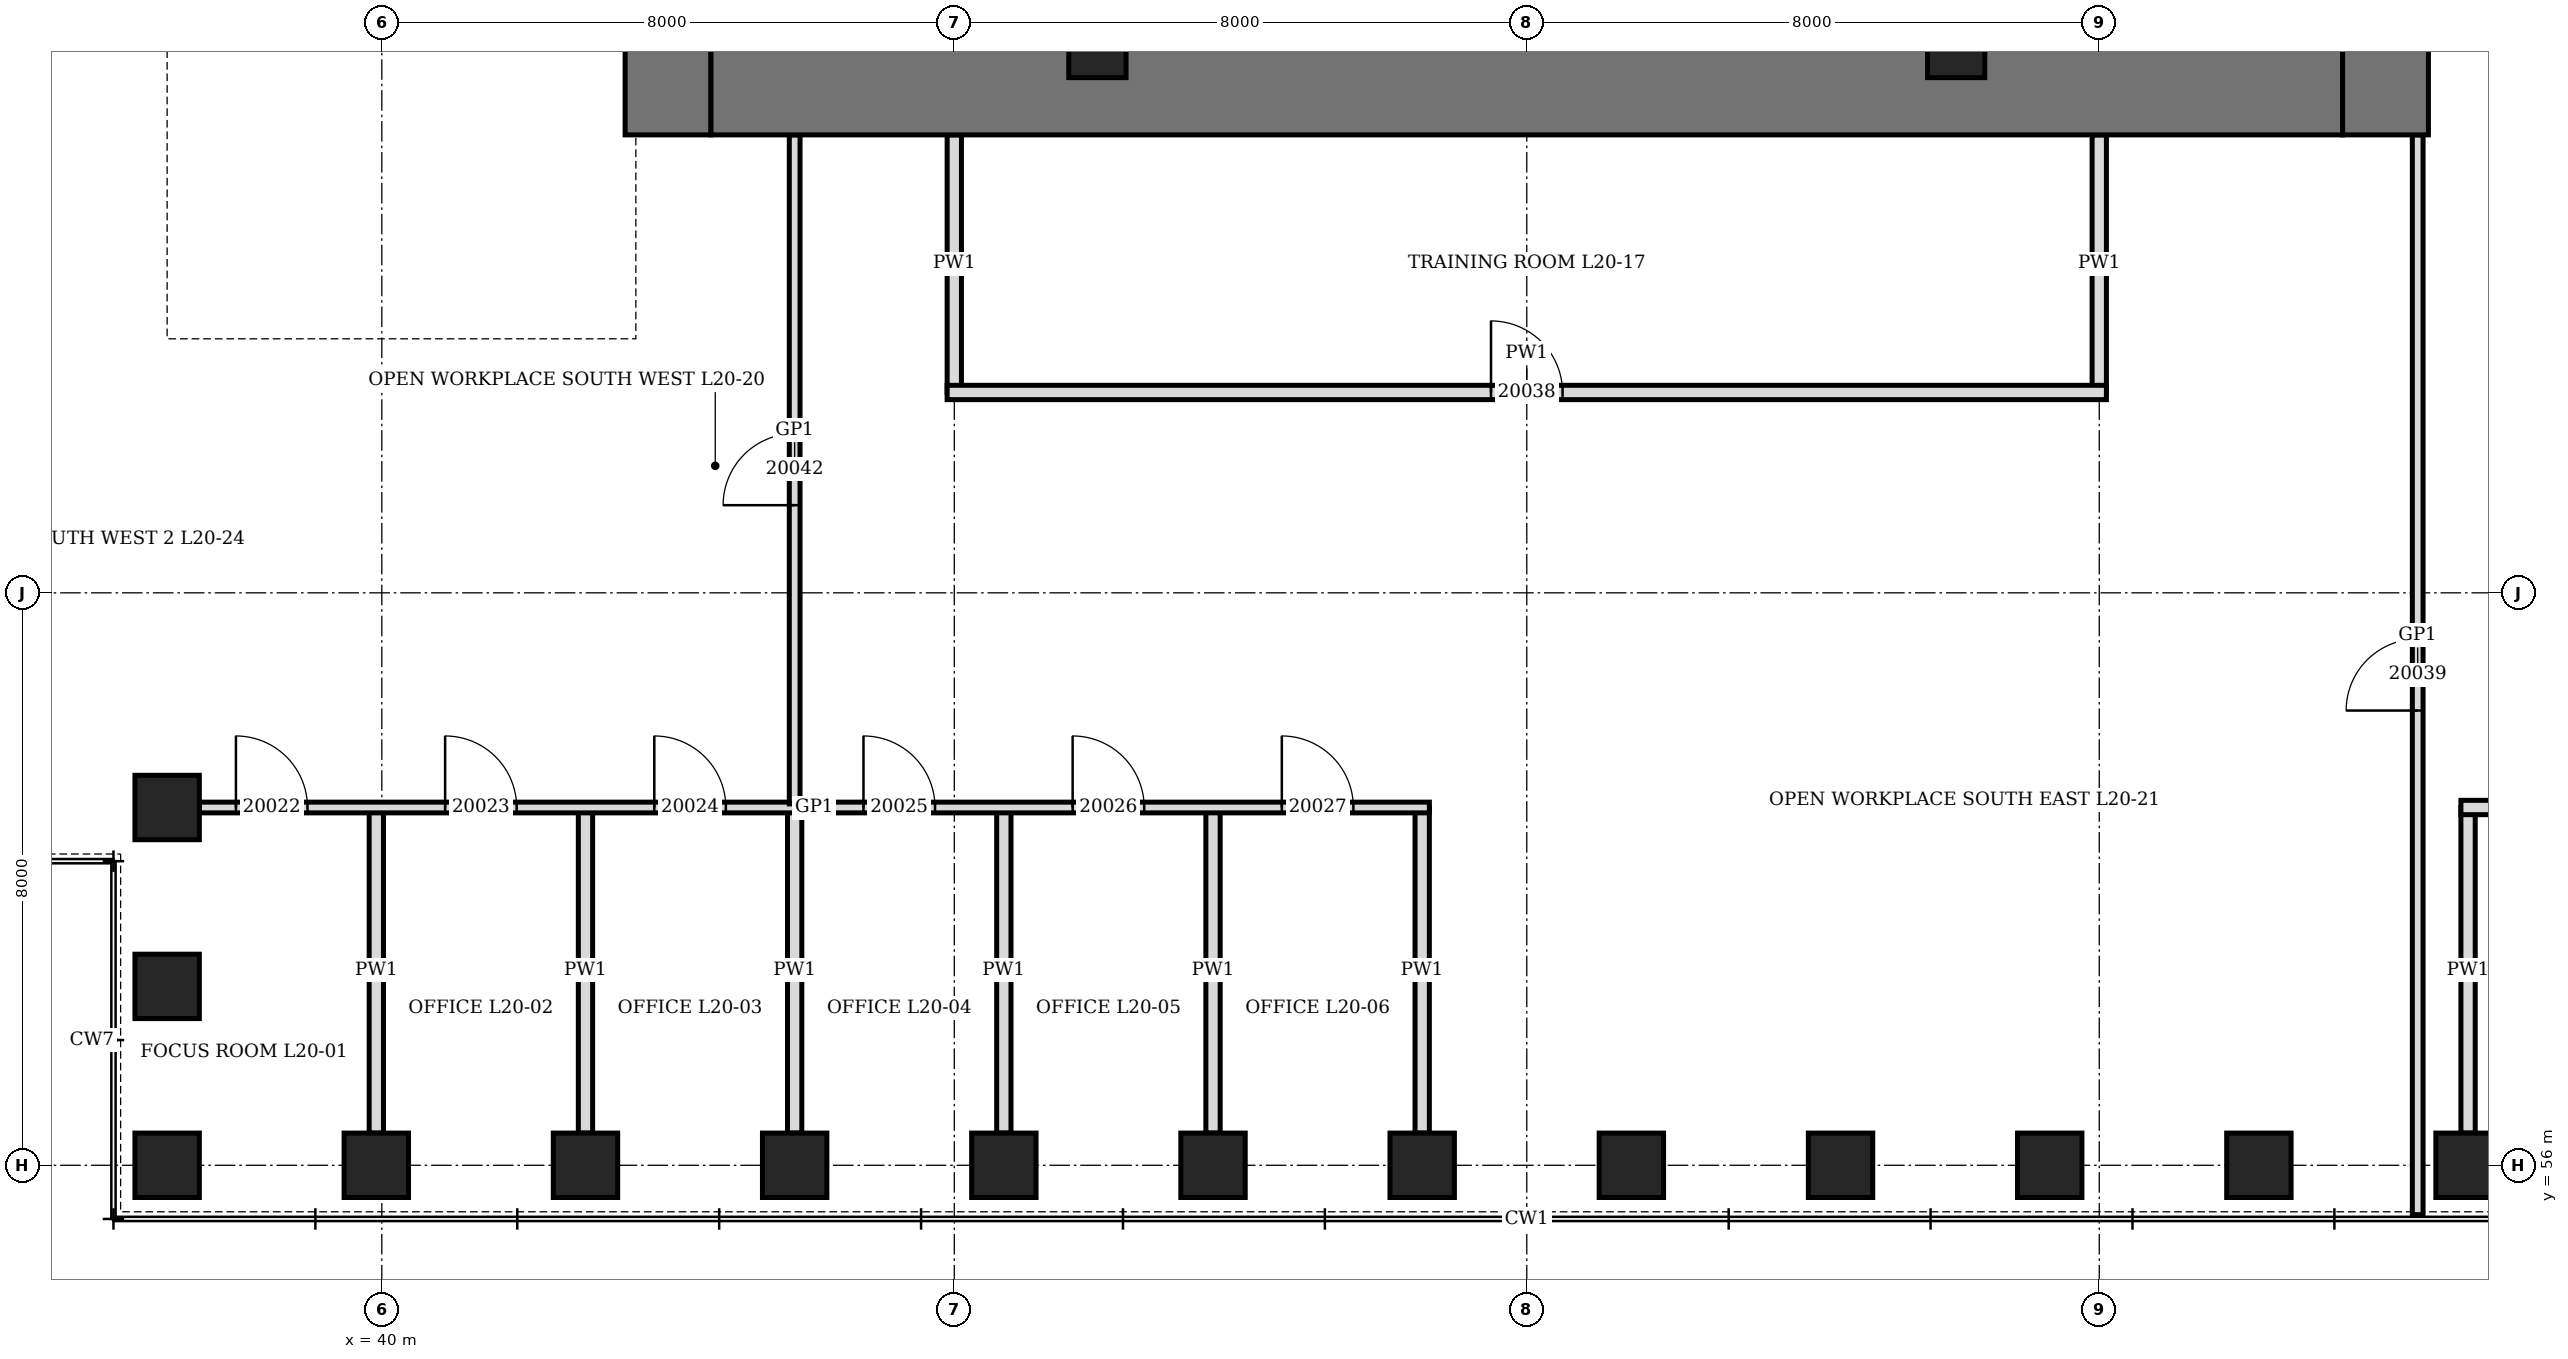
"""IFC4 building model, lengths in metres.
Left out: names, types, materials, properties, quantities, classifications, styles, units other than length and angle.
Written with IfcOpenShell. Run it as: python <this file> out.ifc"""

import sys

from ifc_helpers import new_model, si_unit, direction, frame, frame_2d, origin, origin_2d, place, context, subcontext, project, spatial, rectangle, hollow_rectangle, extrude, element, fill, save


model = new_model("IFC4")
c1 = context("Model", 3, precision=1e-05, world=origin(), true_north=direction((0.0, 1.0)))
c2 = subcontext(c1, "Body", "Model", "MODEL_VIEW")
j1 = project(units=[si_unit("LENGTHUNIT", "METRE"), si_unit("PLANEANGLEUNIT", "RADIAN")], contexts=[c1])
p1 = place(None, origin())
s1 = spatial("IfcSite", under=j1, at=p1, CompositionType="ELEMENT")
p2 = place(p1, origin())
s2 = spatial("IfcBuilding", under=s1, at=p2, CompositionType="ELEMENT")
p3 = place(p2, frame((0.0, 0.0, 93.7)))
s3 = spatial("IfcBuildingStorey", under=s2, at=p3, CompositionType="ELEMENT", Elevation=93.7)
for number, where, z_axis, x_axis in (
    (1, (37.0, 56.0, 0.0), (0.0, 0.0, 1.0), (1.0, 0.0, 0.0)),
    (2, (39.923, 56.0, 0.0), (0.0, 0.0, 1.0), (1.0, 0.0, 0.0)),
    (3, (42.846, 56.0, 0.0), (0.0, 0.0, 1.0), (1.0, 0.0, 0.0)),
    (4, (45.769, 56.0, 0.0), (0.0, 0.0, 1.0), (1.0, 0.0, 0.0)),
    (5, (48.692, 56.0, 0.0), (0.0, 0.0, 1.0), (1.0, 0.0, 0.0)),
    (6, (51.615, 56.0, 0.0), (0.0, 0.0, 1.0), (1.0, 0.0, 0.0)),
    (7, (54.539, 56.0, 0.0), (0.0, 0.0, 1.0), (1.0, 0.0, 0.0)),
    (8, (57.461, 56.0, 0.0), (0.0, 0.0, 1.0), (1.0, 0.0, 0.0)),
    (9, (60.385, 56.0, 0.0), (0.0, 0.0, 1.0), (1.0, 0.0, 0.0)),
    (10, (63.308, 56.0, 0.0), (0.0, 0.0, 1.0), (1.0, 0.0, 0.0)),
    (11, (66.231, 56.0, 0.0), (0.0, 0.0, 1.0), (1.0, 0.0, 0.0)),
    (12, (69.154, 56.0, 0.0), (0.0, 0.0, 1.0), (1.0, 0.0, 0.0)),
    (13, (37.0, 61.0, 0.0), (0.0, 0.0, 1.0), (0.0, 1.0, 0.0)),
    (14, (37.0, 58.5, 0.0), (0.0, 0.0, 1.0), (0.0, 1.0, 0.0)),
):
    element("IfcColumn", number, at=place(p3, frame(where, z_axis=z_axis, x_axis=x_axis)), inside=s3, PredefinedType="COLUMN", context=c2, shape_type="SweptSolid", body=[
        extrude(hollow_rectangle(XDim=0.9, YDim=0.9, WallThickness=0.12, at=origin_2d()), origin(), (0.0, 0.0, 1.0), 4.2),
    ])
p4 = place(p3, frame((44.0, 70.4, 0.0), z_axis=(0.0, 0.0, 1.0), x_axis=(0.0, 1.0, 0.0)))
e15 = element("IfcWall", 15, at=p4, inside=s3, PredefinedType="SHEAR", context=c2, shape_type="SweptSolid", body=[
    extrude(rectangle(XDim=19.2, YDim=1.2, at=frame_2d((9.6, 0.0))), origin(), (0.0, 0.0, 1.0), 4.2),
])
p5 = place(p4, frame((8.6, 0.0, 0.0)))
e16 = element("IfcOpeningElement", 16, at=p5, cuts=e15, PredefinedType="OPENING", context=c2, shape_type="SweptSolid", body=[
    extrude(rectangle(XDim=2.0, YDim=2.4, at=frame_2d((1.0, 1.2))), frame((0.0, 0.61, 0.0), z_axis=(0.0, -1.0, 0.0), x_axis=(1.0, 0.0, 0.0)), (0.0, 0.0, 1.0), 1.22),
])
p6 = place(p3, frame((68.0, 70.4, 0.0), z_axis=(0.0, 0.0, 1.0), x_axis=(0.0, 1.0, 0.0)))
e17 = element("IfcWall", 17, at=p6, inside=s3, PredefinedType="SHEAR", context=c2, shape_type="SweptSolid", body=[
    extrude(rectangle(XDim=19.2, YDim=1.2, at=frame_2d((9.6, 0.0))), origin(), (0.0, 0.0, 1.0), 4.2),
])
p7 = place(p6, frame((8.6, 0.0, 0.0)))
e18 = element("IfcOpeningElement", 18, at=p7, cuts=e17, PredefinedType="OPENING", context=c2, shape_type="SweptSolid", body=[
    extrude(rectangle(XDim=2.0, YDim=2.4, at=frame_2d((1.0, 1.2))), frame((0.0, 0.61, 0.0), z_axis=(0.0, -1.0, 0.0), x_axis=(1.0, 0.0, 0.0)), (0.0, 0.0, 1.0), 1.22),
])
p8 = place(p3, frame((44.6, 71.0, 0.0), z_axis=(0.0, 0.0, 1.0), x_axis=(1.0, 0.0, 0.0)))
e19 = element("IfcWall", 19, at=p8, inside=s3, PredefinedType="SHEAR", context=c2, shape_type="SweptSolid", body=[
    extrude(rectangle(XDim=22.8, YDim=1.2, at=frame_2d((11.4, 0.0))), origin(), (0.0, 0.0, 1.0), 4.2),
])
for number, where, z_axis, x_axis in (
    (20, (50.0, 71.6, 0.0), (0.0, 0.0, 1.0), (1.0, 0.0, 0.0)),
    (21, (62.0, 71.6, 0.0), (0.0, 0.0, 1.0), (1.0, 0.0, 0.0)),
):
    element("IfcColumn", number, at=place(p3, frame(where, z_axis=z_axis, x_axis=x_axis)), inside=s3, PredefinedType="COLUMN", context=c2, shape_type="SweptSolid", body=[
        extrude(hollow_rectangle(XDim=0.8, YDim=0.8, WallThickness=0.1, at=origin_2d()), origin(), (0.0, 0.0, 1.0), 4.2),
    ])
p9 = place(p3, frame((39.923, 56.45, 0.0), z_axis=(0.0, 0.0, 1.0), x_axis=(0.0, 1.0, 0.0)))
e22 = element("IfcWall", 22, at=p9, inside=s3, PredefinedType="PARTITIONING", context=c2, shape_type="SweptSolid", body=[
    extrude(rectangle(XDim=4.55, YDim=0.2, at=frame_2d((2.275, 0.0))), origin(), (0.0, 0.0, 1.0), 3.428),
])
for number, where, z_axis, x_axis in (
    (23, (42.846, 56.45, 0.0), (0.0, 0.0, 1.0), (0.0, 1.0, 0.0)),
    (24, (45.769, 56.45, 0.0), (0.0, 0.0, 1.0), (0.0, 1.0, 0.0)),
    (25, (48.692, 56.45, 0.0), (0.0, 0.0, 1.0), (0.0, 1.0, 0.0)),
    (26, (51.615, 56.45, 0.0), (0.0, 0.0, 1.0), (0.0, 1.0, 0.0)),
    (27, (54.539, 56.45, 0.0), (0.0, 0.0, 1.0), (0.0, 1.0, 0.0)),
    (28, (69.154, 56.45, 0.0), (0.0, 0.0, 1.0), (0.0, 1.0, 0.0)),
):
    element("IfcWall", number, at=place(p3, frame(where, z_axis=z_axis, x_axis=x_axis)), inside=s3, PredefinedType="PARTITIONING", context=c2, shape_type="SweptSolid", body=[
        extrude(rectangle(XDim=4.55, YDim=0.2, at=frame_2d((2.275, 0.0))), origin(), (0.0, 0.0, 1.0), 3.278),
    ])
for number, where, z_axis, x_axis in (
    (29, (48.0, 66.8, 0.0), (0.0, 0.0, 1.0), (0.0, 1.0, 0.0)),
    (30, (64.0, 66.8, 0.0), (0.0, 0.0, 1.0), (0.0, 1.0, 0.0)),
):
    element("IfcWall", number, at=place(p3, frame(where, z_axis=z_axis, x_axis=x_axis)), inside=s3, PredefinedType="PARTITIONING", context=c2, shape_type="SweptSolid", body=[
        extrude(rectangle(XDim=3.6, YDim=0.2, at=frame_2d((1.8, 0.0))), origin(), (0.0, 0.0, 1.0), 4.04),
    ])
p10 = place(p3, frame((37.45, 61.0, 0.0), z_axis=(0.0, 0.0, 1.0), x_axis=(1.0, 0.0, 0.0)))
e31 = element("IfcWall", 31, at=p10, inside=s3, PredefinedType="PARTITIONING", context=c2, shape_type="SweptSolid", body=[
    extrude(rectangle(XDim=17.188, YDim=0.15, at=frame_2d((8.594, 0.0))), origin(), (0.0, 0.0, 1.0), 4.04),
])
p11 = place(p10, frame((0.511, 0.0, 0.0)))
e32 = element("IfcOpeningElement", 32, at=p11, cuts=e31, PredefinedType="OPENING", context=c2, shape_type="SweptSolid", body=[
    extrude(rectangle(XDim=1.0, YDim=2.4, at=frame_2d((0.5, 1.2))), frame((0.0, 0.085, 0.0), z_axis=(0.0, -1.0, 0.0), x_axis=(1.0, 0.0, 0.0)), (0.0, 0.0, 1.0), 0.17),
])
p12 = place(p10, frame((3.435, 0.0, 0.0)))
e33 = element("IfcOpeningElement", 33, at=p12, cuts=e31, PredefinedType="OPENING", context=c2, shape_type="SweptSolid", body=[
    extrude(rectangle(XDim=1.0, YDim=2.1, at=frame_2d((0.5, 1.05))), frame((0.0, 0.085, 0.0), z_axis=(0.0, -1.0, 0.0), x_axis=(1.0, 0.0, 0.0)), (0.0, 0.0, 1.0), 0.17),
])
p13 = place(p10, frame((6.358, 0.0, 0.0)))
e34 = element("IfcOpeningElement", 34, at=p13, cuts=e31, PredefinedType="OPENING", context=c2, shape_type="SweptSolid", body=[
    extrude(rectangle(XDim=1.0, YDim=2.1, at=frame_2d((0.5, 1.05))), frame((0.0, 0.085, 0.0), z_axis=(0.0, -1.0, 0.0), x_axis=(1.0, 0.0, 0.0)), (0.0, 0.0, 1.0), 0.17),
])
p14 = place(p10, frame((9.281, 0.0, 0.0)))
e35 = element("IfcOpeningElement", 35, at=p14, cuts=e31, PredefinedType="OPENING", context=c2, shape_type="SweptSolid", body=[
    extrude(rectangle(XDim=1.0, YDim=2.1, at=frame_2d((0.5, 1.05))), frame((0.0, 0.085, 0.0), z_axis=(0.0, -1.0, 0.0), x_axis=(1.0, 0.0, 0.0)), (0.0, 0.0, 1.0), 0.17),
])
p15 = place(p10, frame((12.204, 0.0, 0.0)))
e36 = element("IfcOpeningElement", 36, at=p15, cuts=e31, PredefinedType="OPENING", context=c2, shape_type="SweptSolid", body=[
    extrude(rectangle(XDim=1.0, YDim=2.1, at=frame_2d((0.5, 1.05))), frame((0.0, 0.085, 0.0), z_axis=(0.0, -1.0, 0.0), x_axis=(1.0, 0.0, 0.0)), (0.0, 0.0, 1.0), 0.17),
])
p16 = place(p10, frame((15.127, 0.0, 0.0)))
e37 = element("IfcOpeningElement", 37, at=p16, cuts=e31, PredefinedType="OPENING", context=c2, shape_type="SweptSolid", body=[
    extrude(rectangle(XDim=1.0, YDim=2.1, at=frame_2d((0.5, 1.05))), frame((0.0, 0.085, 0.0), z_axis=(0.0, -1.0, 0.0), x_axis=(1.0, 0.0, 0.0)), (0.0, 0.0, 1.0), 0.17),
])
p17 = place(p3, frame((69.054, 61.0, 0.0), z_axis=(0.0, 0.0, 1.0), x_axis=(1.0, 0.0, 0.0)))
e38 = element("IfcWall", 38, at=p17, inside=s3, PredefinedType="PARTITIONING", context=c2, shape_type="SweptSolid", body=[
    extrude(rectangle(XDim=5.496, YDim=0.2, at=frame_2d((2.748, 0.0))), origin(), (0.0, 0.0, 1.0), 4.04),
])
p18 = place(p17, frame((1.062, 0.0, 0.0)))
e39 = element("IfcOpeningElement", 39, at=p18, cuts=e38, PredefinedType="OPENING", context=c2, shape_type="SweptSolid", body=[
    extrude(rectangle(XDim=1.0, YDim=2.1, at=frame_2d((0.5, 1.05))), frame((0.0, 0.11, 0.0), z_axis=(0.0, -1.0, 0.0), x_axis=(1.0, 0.0, 0.0)), (0.0, 0.0, 1.0), 0.22),
])
p19 = place(p3, frame((47.9, 66.8, 0.0), z_axis=(0.0, 0.0, 1.0), x_axis=(1.0, 0.0, 0.0)))
e40 = element("IfcWall", 40, at=p19, inside=s3, PredefinedType="PARTITIONING", context=c2, shape_type="SweptSolid", body=[
    extrude(rectangle(XDim=16.2, YDim=0.2, at=frame_2d((8.1, 0.0))), origin(), (0.0, 0.0, 1.0), 4.04),
])
p20 = place(p19, frame((7.6, 0.0, 0.0)))
e41 = element("IfcOpeningElement", 41, at=p20, cuts=e40, PredefinedType="OPENING", context=c2, shape_type="SweptSolid", body=[
    extrude(rectangle(XDim=1.0, YDim=2.1, at=frame_2d((0.5, 1.05))), frame((0.0, 0.11, 0.0), z_axis=(0.0, -1.0, 0.0), x_axis=(1.0, 0.0, 0.0)), (0.0, 0.0, 1.0), 0.22),
])
p21 = place(p3, frame((45.769, 61.05, 0.0), z_axis=(0.0, 0.0, 1.0), x_axis=(0.0, 1.0, 0.0)))
e42 = element("IfcWall", 42, at=p21, inside=s3, PredefinedType="PARTITIONING", context=c2, shape_type="SweptSolid", body=[
    extrude(rectangle(XDim=9.35, YDim=0.15, at=frame_2d((4.675, 0.0))), origin(), (0.0, 0.0, 1.0), 3.278),
])
p22 = place(p21, frame((4.175, 0.0, 0.0)))
e43 = element("IfcOpeningElement", 43, at=p22, cuts=e42, PredefinedType="OPENING", context=c2, shape_type="SweptSolid", body=[
    extrude(rectangle(XDim=1.0, YDim=2.4, at=frame_2d((0.5, 1.2))), frame((0.0, 0.085, 0.0), z_axis=(0.0, -1.0, 0.0), x_axis=(1.0, 0.0, 0.0)), (0.0, 0.0, 1.0), 0.17),
])
p23 = place(p3, frame((68.45, 55.31, 0.0), z_axis=(0.0, 0.0, 1.0), x_axis=(0.0, 1.0, 0.0)))
e44 = element("IfcWall", 44, at=p23, inside=s3, PredefinedType="PARTITIONING", context=c2, shape_type="SweptSolid", body=[
    extrude(rectangle(XDim=15.09, YDim=0.15, at=frame_2d((7.545, 0.0))), origin(), (0.0, 0.0, 1.0), 4.04),
])
p24 = place(p23, frame((7.045, 0.0, 0.0)))
e45 = element("IfcOpeningElement", 45, at=p24, cuts=e44, PredefinedType="OPENING", context=c2, shape_type="SweptSolid", body=[
    extrude(rectangle(XDim=1.0, YDim=2.4, at=frame_2d((0.5, 1.2))), frame((0.0, 0.085, 0.0), z_axis=(0.0, -1.0, 0.0), x_axis=(1.0, 0.0, 0.0)), (0.0, 0.0, 1.0), 0.17),
])
p25 = place(p11, origin())
e46 = element("IfcDoor", 46, at=p25, inside=s3, OperationType="SINGLE_SWING_RIGHT", PredefinedType="DOOR", context=c2, shape_type="SweptSolid", body=[
    extrude(rectangle(XDim=1.0, YDim=2.4, at=frame_2d((0.5, 1.2))), frame((0.0, 0.075, 0.0), z_axis=(0.0, -1.0, 0.0), x_axis=(1.0, 0.0, 0.0)), (0.0, 0.0, 1.0), 0.149),
])
fill(e32, e46)
p26 = place(p12, origin())
e47 = element("IfcDoor", 47, at=p26, inside=s3, OperationType="SINGLE_SWING_LEFT", PredefinedType="DOOR", context=c2, shape_type="SweptSolid", body=[
    extrude(rectangle(XDim=1.0, YDim=2.1, at=frame_2d((0.5, 1.05))), frame((0.0, 0.075, 0.0), z_axis=(0.0, -1.0, 0.0), x_axis=(1.0, 0.0, 0.0)), (0.0, 0.0, 1.0), 0.149),
])
fill(e33, e47)
p27 = place(p13, origin())
e48 = element("IfcDoor", 48, at=p27, inside=s3, OperationType="SINGLE_SWING_LEFT", PredefinedType="DOOR", context=c2, shape_type="SweptSolid", body=[
    extrude(rectangle(XDim=1.0, YDim=2.1, at=frame_2d((0.5, 1.05))), frame((0.0, 0.075, 0.0), z_axis=(0.0, -1.0, 0.0), x_axis=(1.0, 0.0, 0.0)), (0.0, 0.0, 1.0), 0.149),
])
fill(e34, e48)
p28 = place(p14, origin())
e49 = element("IfcDoor", 49, at=p28, inside=s3, OperationType="SINGLE_SWING_LEFT", PredefinedType="DOOR", context=c2, shape_type="SweptSolid", body=[
    extrude(rectangle(XDim=1.0, YDim=2.1, at=frame_2d((0.5, 1.05))), frame((0.0, 0.075, 0.0), z_axis=(0.0, -1.0, 0.0), x_axis=(1.0, 0.0, 0.0)), (0.0, 0.0, 1.0), 0.149),
])
fill(e35, e49)
p29 = place(p15, origin())
e50 = element("IfcDoor", 50, at=p29, inside=s3, OperationType="SINGLE_SWING_LEFT", PredefinedType="DOOR", context=c2, shape_type="SweptSolid", body=[
    extrude(rectangle(XDim=1.0, YDim=2.1, at=frame_2d((0.5, 1.05))), frame((0.0, 0.075, 0.0), z_axis=(0.0, -1.0, 0.0), x_axis=(1.0, 0.0, 0.0)), (0.0, 0.0, 1.0), 0.149),
])
fill(e36, e50)
p30 = place(p16, origin())
e51 = element("IfcDoor", 51, at=p30, inside=s3, OperationType="SINGLE_SWING_LEFT", PredefinedType="DOOR", context=c2, shape_type="SweptSolid", body=[
    extrude(rectangle(XDim=1.0, YDim=2.1, at=frame_2d((0.5, 1.05))), frame((0.0, 0.075, 0.0), z_axis=(0.0, -1.0, 0.0), x_axis=(1.0, 0.0, 0.0)), (0.0, 0.0, 1.0), 0.149),
])
fill(e37, e51)
p31 = place(p20, origin())
e52 = element("IfcDoor", 52, at=p31, inside=s3, OperationType="SINGLE_SWING_LEFT", PredefinedType="DOOR", context=c2, shape_type="SweptSolid", body=[
    extrude(rectangle(XDim=1.0, YDim=2.1, at=frame_2d((0.5, 1.05))), frame((0.0, 0.1, 0.0), z_axis=(0.0, -1.0, 0.0), x_axis=(1.0, 0.0, 0.0)), (0.0, 0.0, 1.0), 0.199),
])
fill(e41, e52)
p32 = place(p24, origin())
e53 = element("IfcDoor", 53, at=p32, inside=s3, OperationType="SINGLE_SWING_RIGHT", PredefinedType="DOOR", context=c2, shape_type="SweptSolid", body=[
    extrude(rectangle(XDim=1.0, YDim=2.4, at=frame_2d((0.5, 1.2))), frame((0.0, 0.075, 0.0), z_axis=(0.0, -1.0, 0.0), x_axis=(1.0, 0.0, 0.0)), (0.0, 0.0, 1.0), 0.149),
])
fill(e45, e53)
p33 = place(p22, origin())
e54 = element("IfcDoor", 54, at=p33, inside=s3, OperationType="SINGLE_SWING_RIGHT", PredefinedType="DOOR", context=c2, shape_type="SweptSolid", body=[
    extrude(rectangle(XDim=1.0, YDim=2.4, at=frame_2d((0.5, 1.2))), frame((0.0, 0.075, 0.0), z_axis=(0.0, -1.0, 0.0), x_axis=(1.0, 0.0, 0.0)), (0.0, 0.0, 1.0), 0.149),
])
fill(e43, e54)
save(model, sys.argv[1])
